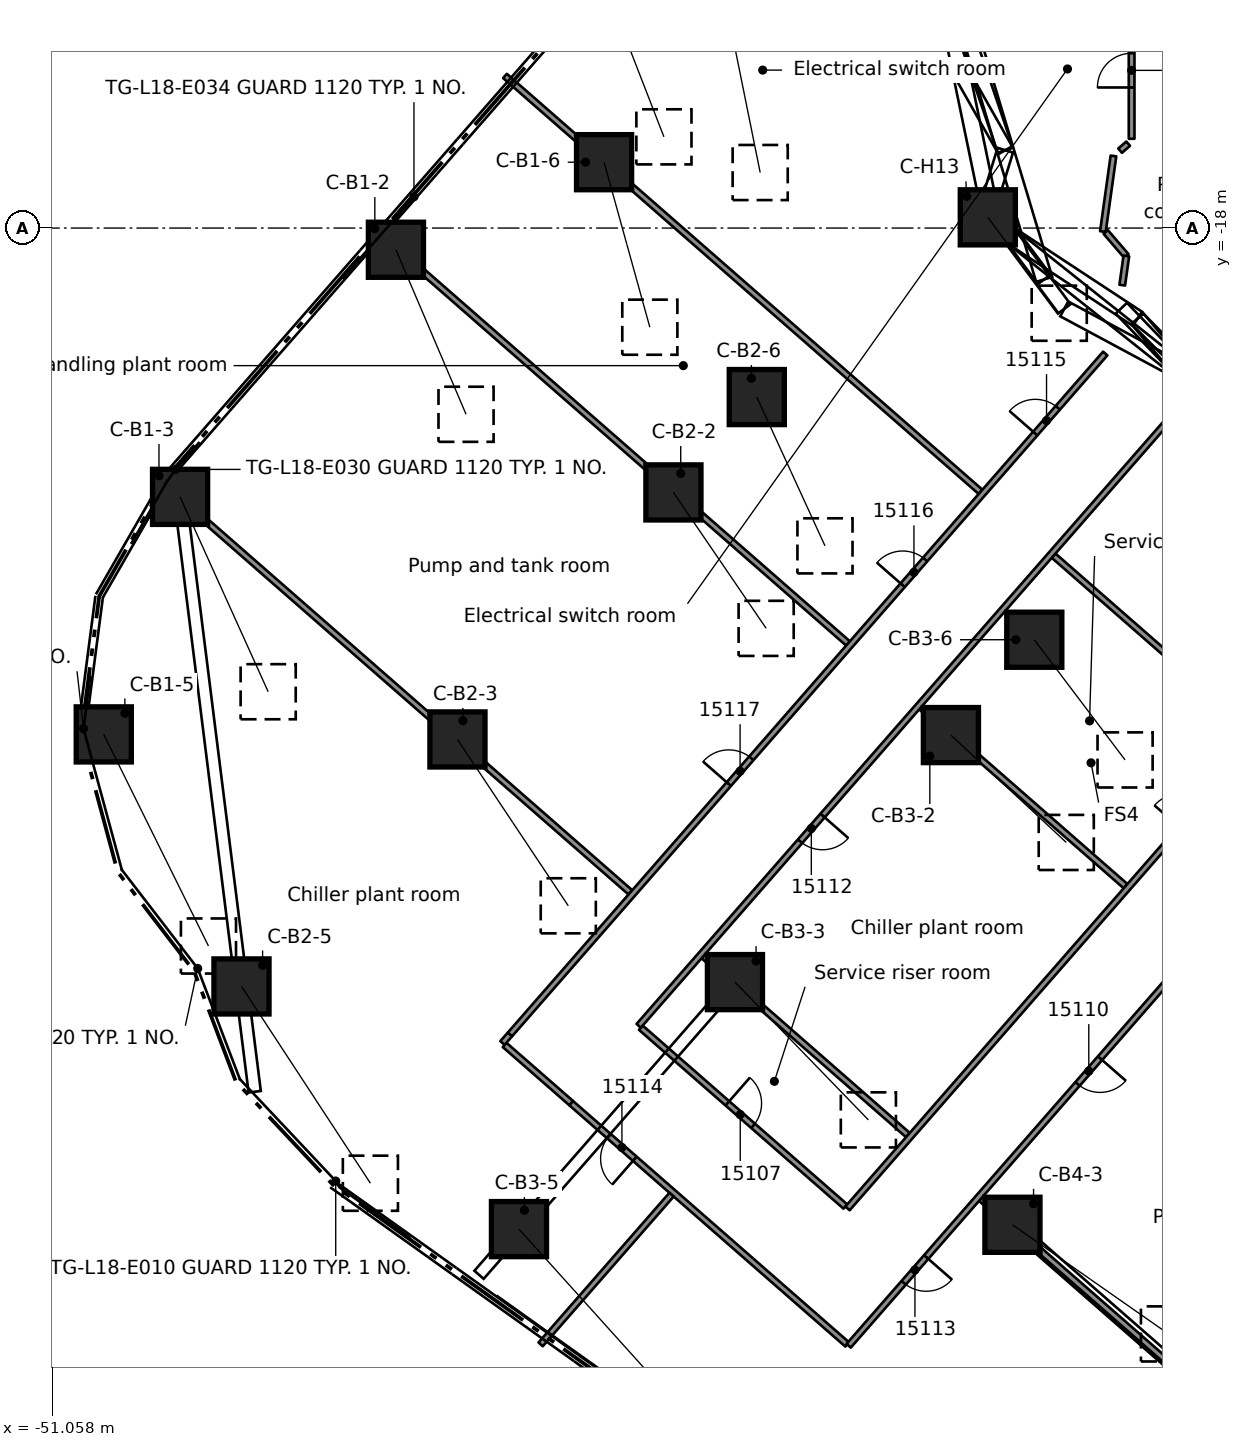
"""IFC4 building model, lengths in metres.
Left out: names, types, materials, properties, quantities, classifications, styles, units other than length and angle.
Written with IfcOpenShell. Run it as: python <this file> out.ifc"""

import sys

from ifc_helpers import new_model, si_unit, direction, frame, frame_2d, origin, origin_2d, place, context, subcontext, project, spatial, rectangle, extrude, element, fill, save


model = new_model("IFC4")
c1 = context("Model", 3, precision=1e-05, world=origin(), true_north=direction((0.0, 1.0)))
c2 = subcontext(c1, "Body", "Model", "MODEL_VIEW")
j1 = project(units=[si_unit("LENGTHUNIT", "METRE"), si_unit("PLANEANGLEUNIT", "RADIAN")], contexts=[c1])
p1 = place(None, origin())
s1 = spatial("IfcSite", under=j1, at=p1, CompositionType="ELEMENT")
p2 = place(p1, origin())
s2 = spatial("IfcBuilding", under=s1, at=p2, CompositionType="ELEMENT")
p3 = place(p2, frame((0.0, 0.0, 76.3)))
s3 = spatial("IfcBuildingStorey", under=s2, at=p3, CompositionType="ELEMENT", Elevation=76.3)
p4 = place(p3, frame((-36.327, -12.072, 0.546), z_axis=(0.27252085226, -0.701871116737, 0.658110416704), x_axis=(0.93219702478, 0.361951249467, 0.0)))
e1 = element("IfcColumn", 1, at=p4, inside=s3, PredefinedType="COLUMN", context=c2, shape_type="SweptSolid", body=[
    extrude(rectangle(XDim=1.45, YDim=1.45, at=origin_2d()), origin(), (0.0, 0.0, 1.0), 5.027),
])
p5 = place(p3, frame((-42.009, -18.571, 0.599), z_axis=(0.324176218571, -0.760615129217, 0.562471692194), x_axis=(0.919932161278, 0.39207756713, 0.0)))
e2 = element("IfcColumn", 2, at=p5, inside=s3, PredefinedType="COLUMN", context=c2, shape_type="SweptSolid", body=[
    extrude(rectangle(XDim=1.45, YDim=1.45, at=origin_2d()), origin(), (0.0, 0.0, 1.0), 5.691),
])
p6 = place(p3, frame((-47.689, -25.073, 0.633), z_axis=(0.359908549294, -0.796090113247, 0.486524786353), x_axis=(0.911205664214, 0.411951741717, 0.0)))
e3 = element("IfcColumn", 3, at=p6, inside=s3, PredefinedType="COLUMN", context=c2, shape_type="SweptSolid", body=[
    extrude(rectangle(XDim=1.45, YDim=1.45, at=origin_2d()), origin(), (0.0, 0.0, 1.0), 6.44),
])
p7 = place(p3, frame((-49.697, -31.323, 0.648), z_axis=(0.396746089317, -0.801824373864, 0.446844731522), x_axis=(0.89628218375, 0.4434842129, 0.0)))
e4 = element("IfcColumn", 4, at=p7, inside=s3, PredefinedType="COLUMN", context=c2, shape_type="SweptSolid", body=[
    extrude(rectangle(XDim=1.45, YDim=1.45, at=origin_2d()), origin(), (0.0, 0.0, 1.0), 6.944),
])
p8 = place(p3, frame((-36.532, -16.267, 0.59), z_axis=(0.217420381869, -0.783982982798, 0.581462862298), x_axis=(0.963629611677, 0.267241410526, 0.0)))
e5 = element("IfcColumn", 5, at=p8, inside=s3, PredefinedType="COLUMN", context=c2, shape_type="SweptSolid", body=[
    extrude(rectangle(XDim=1.45, YDim=1.45, at=origin_2d()), origin(), (0.0, 0.0, 1.0), 5.538),
])
p9 = place(p3, frame((-33.241, -12.503, 0.568), z_axis=(0.155467198112, -0.768136198202, 0.621125374883), x_axis=(0.980126586681, 0.198373067931, 0.0)))
e6 = element("IfcColumn", 6, at=p9, inside=s3, PredefinedType="COLUMN", context=c2, shape_type="SweptSolid", body=[
    extrude(rectangle(XDim=1.45, YDim=1.45, at=origin_2d()), origin(), (0.0, 0.0, 1.0), 5.254),
])
p10 = place(p3, frame((-34.707, -24.956, 0.581), z_axis=(0.451244174402, -0.661514748766, 0.598979909708), x_axis=(0.826104451999, 0.56351702227, 0.0)))
e7 = element("IfcColumn", 7, at=p10, inside=s3, PredefinedType="COLUMN", context=c2, shape_type="SweptSolid", body=[
    extrude(rectangle(XDim=1.45, YDim=1.45, at=origin_2d()), origin(), (0.0, 0.0, 1.0), 5.407),
])
p11 = place(p3, frame((-40.39, -31.456, 0.622), z_axis=(0.475355441993, -0.713570490166, 0.514640028885), x_axis=(0.832243071467, 0.554410921605, 0.0)))
e8 = element("IfcColumn", 8, at=p11, inside=s3, PredefinedType="COLUMN", context=c2, shape_type="SweptSolid", body=[
    extrude(rectangle(XDim=1.45, YDim=1.45, at=origin_2d()), origin(), (0.0, 0.0, 1.0), 6.134),
])
p12 = place(p3, frame((-46.073, -37.955, 0.648), z_axis=(0.48984804458, -0.74774630614, 0.448245864315), x_axis=(0.836489182935, 0.54798343664, 0.0)))
e9 = element("IfcColumn", 9, at=p12, inside=s3, PredefinedType="COLUMN", context=c2, shape_type="SweptSolid", body=[
    extrude(rectangle(XDim=1.45, YDim=1.45, at=origin_2d()), origin(), (0.0, 0.0, 1.0), 6.925),
])
p13 = place(p3, frame((-32.513, -22.447, 0.579), z_axis=(0.332815358907, -0.726323774555, 0.60140478165), x_axis=(0.909104185644, 0.416568817418, 0.0)))
e10 = element("IfcColumn", 10, at=p13, inside=s3, PredefinedType="COLUMN", context=c2, shape_type="SweptSolid", body=[
    extrude(rectangle(XDim=1.45, YDim=1.45, at=origin_2d()), origin(), (0.0, 0.0, 1.0), 5.39),
])
p14 = place(p3, frame((-27.405, -31.341, 0.57), z_axis=(0.575393887431, -0.535587054257, 0.61811680257), x_axis=(0.681333687003, 0.731972955071, 0.0)))
e11 = element("IfcColumn", 11, at=p14, inside=s3, PredefinedType="COLUMN", context=c2, shape_type="SweptSolid", body=[
    extrude(rectangle(XDim=1.45, YDim=1.45, at=origin_2d()), origin(), (0.0, 0.0, 1.0), 5.274),
])
p15 = place(p3, frame((-33.088, -37.841, 0.614), z_axis=(0.589009270479, -0.60813640554, 0.532201269773), x_axis=(0.718312748946, 0.695720342308, 0.0)))
e12 = element("IfcColumn", 12, at=p15, inside=s3, PredefinedType="COLUMN", context=c2, shape_type="SweptSolid", body=[
    extrude(rectangle(XDim=1.45, YDim=1.45, at=origin_2d()), origin(), (0.0, 0.0, 1.0), 5.961),
])
p16 = place(p3, frame((-38.771, -44.34, 0.642), z_axis=(0.593098292214, -0.65839684891, 0.463409112036), x_axis=(0.742990429267, 0.669302040949, 0.0)))
e13 = element("IfcColumn", 13, at=p16, inside=s3, PredefinedType="COLUMN", context=c2, shape_type="SweptSolid", body=[
    extrude(rectangle(XDim=1.45, YDim=1.45, at=origin_2d()), origin(), (0.0, 0.0, 1.0), 6.722),
])
p17 = place(p3, frame((-25.211, -28.832, 0.558), z_axis=(0.464138906746, -0.614551218784, 0.637888606839), x_axis=(0.79798514852, 0.602677113173, 0.0)))
e14 = element("IfcColumn", 14, at=p17, inside=s3, PredefinedType="COLUMN", context=c2, shape_type="SweptSolid", body=[
    extrude(rectangle(XDim=1.45, YDim=1.45, at=origin_2d()), origin(), (0.0, 0.0, 1.0), 5.147),
])
p18 = place(p3, frame((-25.786, -44.226, 0.612), z_axis=(0.692169494024, -0.484123543715, 0.535281034563), x_axis=(0.573148371456, 0.819451611931, 0.0)))
e15 = element("IfcColumn", 15, at=p18, inside=s3, PredefinedType="COLUMN", context=c2, shape_type="SweptSolid", body=[
    extrude(rectangle(XDim=1.45, YDim=1.45, at=origin_2d()), origin(), (0.0, 0.0, 1.0), 5.932),
])
p19 = place(p3, frame((-26.434, -17.718, 0.491), z_axis=(0.404525579295, -0.5431164527, 0.735787723805), x_axis=(0.801988529127, 0.597339433781, 0.0)))
e16 = element("IfcColumn", 16, at=p19, inside=s3, PredefinedType="COLUMN", context=c2, shape_type="SweptSolid", body=[
    extrude(rectangle(XDim=1.45, YDim=1.45, at=origin_2d()), origin(), (0.0, 0.0, 1.0), 4.645),
])
p20 = place(p3, frame((-30.134, -47.375, 0.0), z_axis=(0.0, 0.0, 1.0), x_axis=(-0.752869704011, 0.658169589682, 0.0)))
e17 = element("IfcWall", 17, at=p20, inside=s3, PredefinedType="PARTITIONING", context=c2, shape_type="SweptSolid", body=[
    extrude(rectangle(XDim=9.65, YDim=0.15, at=frame_2d((4.825, 0.0))), origin(), (0.0, 0.0, 1.0), 3.98),
])
p21 = place(p20, frame((7.424, 0.0, 0.0)))
e18 = element("IfcOpeningElement", 18, at=p21, cuts=e17, PredefinedType="OPENING", context=c2, shape_type="SweptSolid", body=[
    extrude(rectangle(XDim=0.9, YDim=2.1, at=frame_2d((0.45, 1.05))), frame((0.0, 0.085, 0.0), z_axis=(0.0, -1.0, 0.0), x_axis=(1.0, 0.0, 0.0)), (0.0, 0.0, 1.0), 0.17),
])
p22 = place(p3, frame((-35.565, -39.04, 0.0), z_axis=(0.0, 0.0, 1.0), x_axis=(0.752862172491, -0.658178204768, 0.0)))
e19 = element("IfcWall", 19, at=p22, inside=s3, PredefinedType="PARTITIONING", context=c2, shape_type="SweptSolid", body=[
    extrude(rectangle(XDim=7.15, YDim=0.15, at=frame_2d((3.575, 0.0))), origin(), (0.0, 0.0, 1.0), 3.98),
])
p23 = place(p22, frame((3.025, 0.0, 0.0)))
e20 = element("IfcOpeningElement", 20, at=p23, cuts=e19, PredefinedType="OPENING", context=c2, shape_type="SweptSolid", body=[
    extrude(rectangle(XDim=0.9, YDim=2.1, at=frame_2d((0.45, 1.05))), frame((0.0, 0.085, 0.0), z_axis=(0.0, -1.0, 0.0), x_axis=(1.0, 0.0, 0.0)), (0.0, 0.0, 1.0), 0.17),
])
p24 = place(p3, frame((-48.313, -24.572, 0.0), z_axis=(0.0, 0.0, 1.0), x_axis=(0.752776539597, -0.658276143751, 0.0)))
e21 = element("IfcWall", 21, at=p24, inside=s3, PredefinedType="PARTITIONING", context=c2, shape_type="SweptSolid", body=[
    extrude(rectangle(XDim=16.571, YDim=0.15, at=frame_2d((8.285, 0.0))), origin(), (0.0, 0.0, 1.0), 3.98),
])
p25 = place(p3, frame((-33.919, -37.158, 0.0), z_axis=(0.0, 0.0, 1.0), x_axis=(0.752720514165, -0.658340206546, 0.0)))
e22 = element("IfcWall", 22, at=p25, inside=s3, PredefinedType="PARTITIONING", context=c2, shape_type="SweptSolid", body=[
    extrude(rectangle(XDim=7.15, YDim=0.15, at=frame_2d((3.575, 0.0))), origin(), (0.0, 0.0, 1.0), 3.98),
])
p26 = place(p3, frame((-26.617, -43.543, 0.0), z_axis=(0.0, 0.0, 1.0), x_axis=(0.752799620159, -0.658249748871, 0.0)))
e23 = element("IfcWall", 23, at=p26, inside=s3, PredefinedType="PARTITIONING", context=c2, shape_type="SweptSolid", body=[
    extrude(rectangle(XDim=16.415, YDim=0.15, at=frame_2d((8.207, 0.0))), origin(), (0.0, 0.0, 1.0), 3.98),
])
p27 = place(p3, frame((-42.628, -17.987, 0.0), z_axis=(0.0, 0.0, 1.0), x_axis=(0.752830443713, -0.658214496208, 0.0)))
e24 = element("IfcWall", 24, at=p27, inside=s3, PredefinedType="PARTITIONING", context=c2, shape_type="SweptSolid", body=[
    extrude(rectangle(XDim=16.625, YDim=0.15, at=frame_2d((8.312, 0.0))), origin(), (0.0, 0.0, 1.0), 3.98),
])
p28 = place(p3, frame((-28.193, -30.609, 0.0), z_axis=(0.0, 0.0, 1.0), x_axis=(0.752862172491, -0.658178204768, 0.0)))
e25 = element("IfcWall", 25, at=p28, inside=s3, PredefinedType="PARTITIONING", context=c2, shape_type="SweptSolid", body=[
    extrude(rectangle(XDim=7.15, YDim=0.15, at=frame_2d((3.575, 0.0))), origin(), (0.0, 0.0, 1.0), 3.98),
])
p29 = place(p3, frame((-39.14, -13.998, 0.0), z_axis=(0.0, 0.0, 1.0), x_axis=(0.752808649714, -0.658239422184, 0.0)))
e26 = element("IfcWall", 26, at=p29, inside=s3, PredefinedType="PARTITIONING", context=c2, shape_type="SweptSolid", body=[
    extrude(rectangle(XDim=16.623, YDim=0.15, at=frame_2d((8.312, 0.0))), origin(), (0.0, 0.0, 1.0), 3.98),
])
p30 = place(p3, frame((-24.704, -26.619, 0.0), z_axis=(0.0, 0.0, 1.0), x_axis=(0.752862172491, -0.658178204768, 0.0)))
e27 = element("IfcWall", 27, at=p30, inside=s3, PredefinedType="PARTITIONING", context=c2, shape_type="SweptSolid", body=[
    extrude(rectangle(XDim=7.15, YDim=0.15, at=frame_2d((3.575, 0.0))), origin(), (0.0, 0.0, 1.0), 3.98),
])
p31 = place(p3, frame((-39.15, -39.493, 0.0), z_axis=(0.0, 0.0, 1.0), x_axis=(0.753018801652, -0.657999000272, 0.0)))
e28 = element("IfcWall", 28, at=p31, inside=s3, PredefinedType="PARTITIONING", context=c2, shape_type="SweptSolid", body=[
    extrude(rectangle(XDim=2.325, YDim=0.15, at=frame_2d((1.163, 0.0))), origin(), (0.0, 0.0, 1.0), 3.98),
])
p32 = place(p3, frame((-23.332, -18.103, 0.0), z_axis=(0.0, 0.0, 1.0), x_axis=(0.652335975093, -0.757929927896, 0.0)))
e29 = element("IfcWall", 29, at=p32, inside=s3, PredefinedType="PARTITIONING", context=c2, shape_type="SweptSolid", body=[
    extrude(rectangle(XDim=0.832, YDim=0.15, at=frame_2d((0.416, 0.0))), origin(), (0.0, 0.0, 1.0), 3.98),
])
p33 = place(p3, frame((-22.953, -15.964, 0.0), z_axis=(0.0, 0.0, 1.0), x_axis=(0.754942462209, 0.65579103284, 0.0)))
e30 = element("IfcWall", 30, at=p33, inside=s3, PredefinedType="PARTITIONING", context=c2, shape_type="SweptSolid", body=[
    extrude(rectangle(XDim=0.281, YDim=0.15, at=frame_2d((0.14, 0.0))), origin(), (0.0, 0.0, 1.0), 3.98),
])
p34 = place(p3, frame((-13.766, -28.732, 0.0), z_axis=(0.0, 0.0, 1.0), x_axis=(-0.658218220516, -0.752827187461, 0.0)))
e31 = element("IfcWall", 31, at=p34, inside=s3, PredefinedType="PARTITIONING", context=c2, shape_type="SweptSolid", body=[
    extrude(rectangle(XDim=24.809, YDim=0.15, at=frame_2d((12.405, 0.0))), origin(), (0.0, 0.0, 1.0), 3.98),
])
p35 = place(p34, frame((1.103, 0.0, 0.0)))
e32 = element("IfcOpeningElement", 32, at=p35, cuts=e31, PredefinedType="OPENING", context=c2, shape_type="SweptSolid", body=[
    extrude(rectangle(XDim=0.9, YDim=2.1, at=frame_2d((0.45, 1.05))), frame((0.0, 0.085, 0.0), z_axis=(0.0, -1.0, 0.0), x_axis=(1.0, 0.0, 0.0)), (0.0, 0.0, 1.0), 0.17),
])
p36 = place(p34, frame((8.71, 0.0, 0.0)))
e33 = element("IfcOpeningElement", 33, at=p36, cuts=e31, PredefinedType="OPENING", context=c2, shape_type="SweptSolid", body=[
    extrude(rectangle(XDim=0.9, YDim=2.1, at=frame_2d((0.45, 1.05))), frame((0.0, 0.085, 0.0), z_axis=(0.0, -1.0, 0.0), x_axis=(1.0, 0.0, 0.0)), (0.0, 0.0, 1.0), 0.17),
])
p37 = place(p34, frame((14.759, 0.0, 0.0)))
e34 = element("IfcOpeningElement", 34, at=p37, cuts=e31, PredefinedType="OPENING", context=c2, shape_type="SweptSolid", body=[
    extrude(rectangle(XDim=0.9, YDim=2.1, at=frame_2d((0.45, 1.05))), frame((0.0, 0.085, 0.0), z_axis=(0.0, -1.0, 0.0), x_axis=(1.0, 0.0, 0.0)), (0.0, 0.0, 1.0), 0.17),
])
p38 = place(p34, frame((21.709, 0.0, 0.0)))
e35 = element("IfcOpeningElement", 35, at=p38, cuts=e31, PredefinedType="OPENING", context=c2, shape_type="SweptSolid", body=[
    extrude(rectangle(XDim=0.9, YDim=2.1, at=frame_2d((0.45, 1.05))), frame((0.0, 0.085, 0.0), z_axis=(0.0, -1.0, 0.0), x_axis=(1.0, 0.0, 0.0)), (0.0, 0.0, 1.0), 0.17),
])
p39 = place(p3, frame((-30.126, -43.795, 0.0), z_axis=(0.0, 0.0, 1.0), x_axis=(0.658319349285, 0.752738755716, 0.0)))
e36 = element("IfcWall", 36, at=p39, inside=s3, PredefinedType="PARTITIONING", context=c2, shape_type="SweptSolid", body=[
    extrude(rectangle(XDim=21.647, YDim=0.15, at=frame_2d((10.824, 0.0))), origin(), (0.0, 0.0, 1.0), 3.98),
])
p40 = place(p39, frame((13.3, 0.0, 0.0)))
e37 = element("IfcOpeningElement", 37, at=p40, cuts=e36, PredefinedType="OPENING", context=c2, shape_type="SweptSolid", body=[
    extrude(rectangle(XDim=0.9, YDim=2.1, at=frame_2d((0.45, 1.05))), frame((0.0, 0.085, 0.0), z_axis=(0.0, -1.0, 0.0), x_axis=(1.0, 0.0, 0.0)), (0.0, 0.0, 1.0), 0.17),
])
p41 = place(p39, frame((18.6, 0.0, 0.0)))
e38 = element("IfcOpeningElement", 38, at=p41, cuts=e36, PredefinedType="OPENING", context=c2, shape_type="SweptSolid", body=[
    extrude(rectangle(XDim=0.9, YDim=2.1, at=frame_2d((0.45, 1.05))), frame((0.0, 0.085, 0.0), z_axis=(0.0, -1.0, 0.0), x_axis=(1.0, 0.0, 0.0)), (0.0, 0.0, 1.0), 0.17),
])
p42 = place(p3, frame((-38.201, -47.373, 0.0), z_axis=(0.0, 0.0, 1.0), x_axis=(0.658220537384, 0.752825161751, 0.0)))
e39 = element("IfcWall", 39, at=p42, inside=s3, PredefinedType="PARTITIONING", context=c2, shape_type="SweptSolid", body=[
    extrude(rectangle(XDim=5.234, YDim=0.15, at=frame_2d((2.617, 0.0))), origin(), (0.0, 0.0, 1.0), 3.98),
])
p43 = place(p3, frame((-21.17, -22.468, 0.0), z_axis=(0.0, 0.0, 1.0), x_axis=(-0.658339236885, -0.752721362243, 0.0)))
e40 = element("IfcWall", 40, at=p43, inside=s3, PredefinedType="PARTITIONING", context=c2, shape_type="SweptSolid", body=[
    extrude(rectangle(XDim=21.951, YDim=0.15, at=frame_2d((10.976, 0.0))), origin(), (0.0, 0.0, 1.0), 3.98),
])
p44 = place(p43, frame((14.601, 0.0, 0.0)))
e41 = element("IfcOpeningElement", 41, at=p44, cuts=e40, PredefinedType="OPENING", context=c2, shape_type="SweptSolid", body=[
    extrude(rectangle(XDim=0.9, YDim=2.1, at=frame_2d((0.45, 1.05))), frame((0.0, 0.085, 0.0), z_axis=(0.0, -1.0, 0.0), x_axis=(1.0, 0.0, 0.0)), (0.0, 0.0, 1.0), 0.17),
])
p45 = place(p3, frame((-39.206, -39.443, 0.0), z_axis=(0.0, 0.0, 1.0), x_axis=(0.658849625357, 0.752274664711, 0.0)))
e42 = element("IfcWall", 42, at=p45, inside=s3, PredefinedType="PARTITIONING", context=c2, shape_type="SweptSolid", body=[
    extrude(rectangle(XDim=0.301, YDim=0.15, at=frame_2d((0.15, 0.0))), origin(), (0.0, 0.0, 1.0), 3.98),
])
p46 = place(p3, frame((-39.008, -39.217, 0.0), z_axis=(0.0, 0.0, 1.0), x_axis=(0.658208230207, 0.752835922156, 0.0)))
e43 = element("IfcWall", 43, at=p46, inside=s3, PredefinedType="PARTITIONING", context=c2, shape_type="SweptSolid", body=[
    extrude(rectangle(XDim=23.798, YDim=0.15, at=frame_2d((11.899, 0.0))), origin(), (0.0, 0.0, 1.0), 3.98),
])
p47 = place(p46, frame((21.001, 0.0, 0.0)))
e44 = element("IfcOpeningElement", 44, at=p47, cuts=e43, PredefinedType="OPENING", context=c2, shape_type="SweptSolid", body=[
    extrude(rectangle(XDim=0.9, YDim=2.1, at=frame_2d((0.45, 1.05))), frame((0.0, 0.085, 0.0), z_axis=(0.0, -1.0, 0.0), x_axis=(1.0, 0.0, 0.0)), (0.0, 0.0, 1.0), 0.17),
])
p48 = place(p46, frame((15.7, 0.0, 0.0)))
e45 = element("IfcOpeningElement", 45, at=p48, cuts=e43, PredefinedType="OPENING", context=c2, shape_type="SweptSolid", body=[
    extrude(rectangle(XDim=0.9, YDim=2.1, at=frame_2d((0.45, 1.05))), frame((0.0, 0.085, 0.0), z_axis=(0.0, -1.0, 0.0), x_axis=(1.0, 0.0, 0.0)), (0.0, 0.0, 1.0), 0.17),
])
p49 = place(p46, frame((8.749, 0.0, 0.0)))
e46 = element("IfcOpeningElement", 46, at=p49, cuts=e43, PredefinedType="OPENING", context=c2, shape_type="SweptSolid", body=[
    extrude(rectangle(XDim=0.9, YDim=2.1, at=frame_2d((0.45, 1.05))), frame((0.0, 0.085, 0.0), z_axis=(0.0, -1.0, 0.0), x_axis=(1.0, 0.0, 0.0)), (0.0, 0.0, 1.0), 0.17),
])
p50 = place(p3, frame((-22.897, -19.502, 0.0), z_axis=(0.0, 0.0, 1.0), x_axis=(0.139129433731, 0.990274204789, 0.0)))
e47 = element("IfcWall", 47, at=p50, inside=s3, PredefinedType="PARTITIONING", context=c2, shape_type="SweptSolid", body=[
    extrude(rectangle(XDim=0.776, YDim=0.15, at=frame_2d((0.388, 0.0))), origin(), (0.0, 0.0, 1.0), 3.98),
])
p51 = place(p3, frame((-23.406, -18.093, 0.0), z_axis=(0.0, 0.0, 1.0), x_axis=(0.138392820207, 0.990377416602, 0.0)))
e48 = element("IfcWall", 48, at=p51, inside=s3, PredefinedType="PARTITIONING", context=c2, shape_type="SweptSolid", body=[
    extrude(rectangle(XDim=2.009, YDim=0.15, at=frame_2d((1.005, 0.0))), origin(), (0.0, 0.0, 1.0), 3.98),
])
p52 = place(p3, frame((-22.65, -15.651, 0.0), z_axis=(0.0, 0.0, 1.0), x_axis=(0.0, 1.0, 0.0)))
e49 = element("IfcWall", 49, at=p52, inside=s3, PredefinedType="PARTITIONING", context=c2, shape_type="SweptSolid", body=[
    extrude(rectangle(XDim=3.651, YDim=0.15, at=frame_2d((1.825, 0.0))), origin(), (0.0, 0.0, 1.0), 3.98),
])
p53 = place(p52, frame((1.35, 0.0, 0.0)))
e50 = element("IfcOpeningElement", 50, at=p53, cuts=e49, PredefinedType="OPENING", context=c2, shape_type="SweptSolid", body=[
    extrude(rectangle(XDim=0.9, YDim=2.1, at=frame_2d((0.45, 1.05))), frame((0.0, 0.085, 0.0), z_axis=(0.0, -1.0, 0.0), x_axis=(1.0, 0.0, 0.0)), (0.0, 0.0, 1.0), 0.17),
])
p54 = place(p23, origin())
e51 = element("IfcDoor", 51, at=p54, inside=s3, OperationType="SINGLE_SWING_LEFT", PredefinedType="DOOR", context=c2, shape_type="SweptSolid", body=[
    extrude(rectangle(XDim=0.9, YDim=2.1, at=frame_2d((0.45, 1.05))), frame((0.0, 0.025, 0.0), z_axis=(0.0, -1.0, 0.0), x_axis=(1.0, 0.0, 0.0)), (0.0, 0.0, 1.0), 0.05),
])
fill(e20, e51)
p55 = place(p37, origin())
e52 = element("IfcDoor", 52, at=p55, inside=s3, OperationType="SINGLE_SWING_RIGHT", PredefinedType="DOOR", context=c2, shape_type="SweptSolid", body=[
    extrude(rectangle(XDim=0.9, YDim=2.1, at=frame_2d((0.45, 1.05))), frame((0.0, 0.025, 0.0), z_axis=(0.0, -1.0, 0.0), x_axis=(1.0, 0.0, 0.0)), (0.0, 0.0, 1.0), 0.05),
])
fill(e34, e52)
p56 = place(p44, origin())
e53 = element("IfcDoor", 53, at=p56, inside=s3, OperationType="SINGLE_SWING_RIGHT", PredefinedType="DOOR", context=c2, shape_type="SweptSolid", body=[
    extrude(rectangle(XDim=0.9, YDim=2.1, at=frame_2d((0.45, 1.05))), frame((0.0, 0.025, 0.0), z_axis=(0.0, -1.0, 0.0), x_axis=(1.0, 0.0, 0.0)), (0.0, 0.0, 1.0), 0.05),
])
fill(e41, e53)
p57 = place(p38, origin())
e54 = element("IfcDoor", 54, at=p57, inside=s3, OperationType="SINGLE_SWING_RIGHT", PredefinedType="DOOR", context=c2, shape_type="SweptSolid", body=[
    extrude(rectangle(XDim=0.9, YDim=2.1, at=frame_2d((0.45, 1.05))), frame((0.0, 0.025, 0.0), z_axis=(0.0, -1.0, 0.0), x_axis=(1.0, 0.0, 0.0)), (0.0, 0.0, 1.0), 0.05),
])
fill(e35, e54)
p58 = place(p21, origin())
e55 = element("IfcDoor", 55, at=p58, inside=s3, OperationType="SINGLE_SWING_RIGHT", PredefinedType="DOOR", context=c2, shape_type="SweptSolid", body=[
    extrude(rectangle(XDim=0.9, YDim=2.1, at=frame_2d((0.45, 1.05))), frame((0.0, 0.025, 0.0), z_axis=(0.0, -1.0, 0.0), x_axis=(1.0, 0.0, 0.0)), (0.0, 0.0, 1.0), 0.05),
])
fill(e18, e55)
p59 = place(p47, origin())
e56 = element("IfcDoor", 56, at=p59, inside=s3, OperationType="SINGLE_SWING_RIGHT", PredefinedType="DOOR", context=c2, shape_type="SweptSolid", body=[
    extrude(rectangle(XDim=0.9, YDim=2.1, at=frame_2d((0.45, 1.05))), frame((0.0, 0.025, 0.0), z_axis=(0.0, -1.0, 0.0), x_axis=(1.0, 0.0, 0.0)), (0.0, 0.0, 1.0), 0.05),
])
fill(e44, e56)
p60 = place(p48, origin())
e57 = element("IfcDoor", 57, at=p60, inside=s3, OperationType="SINGLE_SWING_RIGHT", PredefinedType="DOOR", context=c2, shape_type="SweptSolid", body=[
    extrude(rectangle(XDim=0.9, YDim=2.1, at=frame_2d((0.45, 1.05))), frame((0.0, 0.025, 0.0), z_axis=(0.0, -1.0, 0.0), x_axis=(1.0, 0.0, 0.0)), (0.0, 0.0, 1.0), 0.05),
])
fill(e45, e57)
p61 = place(p49, origin())
e58 = element("IfcDoor", 58, at=p61, inside=s3, OperationType="SINGLE_SWING_LEFT", PredefinedType="DOOR", context=c2, shape_type="SweptSolid", body=[
    extrude(rectangle(XDim=0.9, YDim=2.1, at=frame_2d((0.45, 1.05))), frame((0.0, 0.025, 0.0), z_axis=(0.0, -1.0, 0.0), x_axis=(1.0, 0.0, 0.0)), (0.0, 0.0, 1.0), 0.05),
])
fill(e46, e58)
p62 = place(p53, origin())
e59 = element("IfcDoor", 59, at=p62, inside=s3, OperationType="SINGLE_SWING_LEFT", PredefinedType="DOOR", context=c2, shape_type="SweptSolid", body=[
    extrude(rectangle(XDim=0.9, YDim=2.1, at=frame_2d((0.45, 1.05))), frame((0.0, 0.025, 0.0), z_axis=(0.0, -1.0, 0.0), x_axis=(1.0, 0.0, 0.0)), (0.0, 0.0, 1.0), 0.05),
])
fill(e50, e59)
save(model, sys.argv[1])
